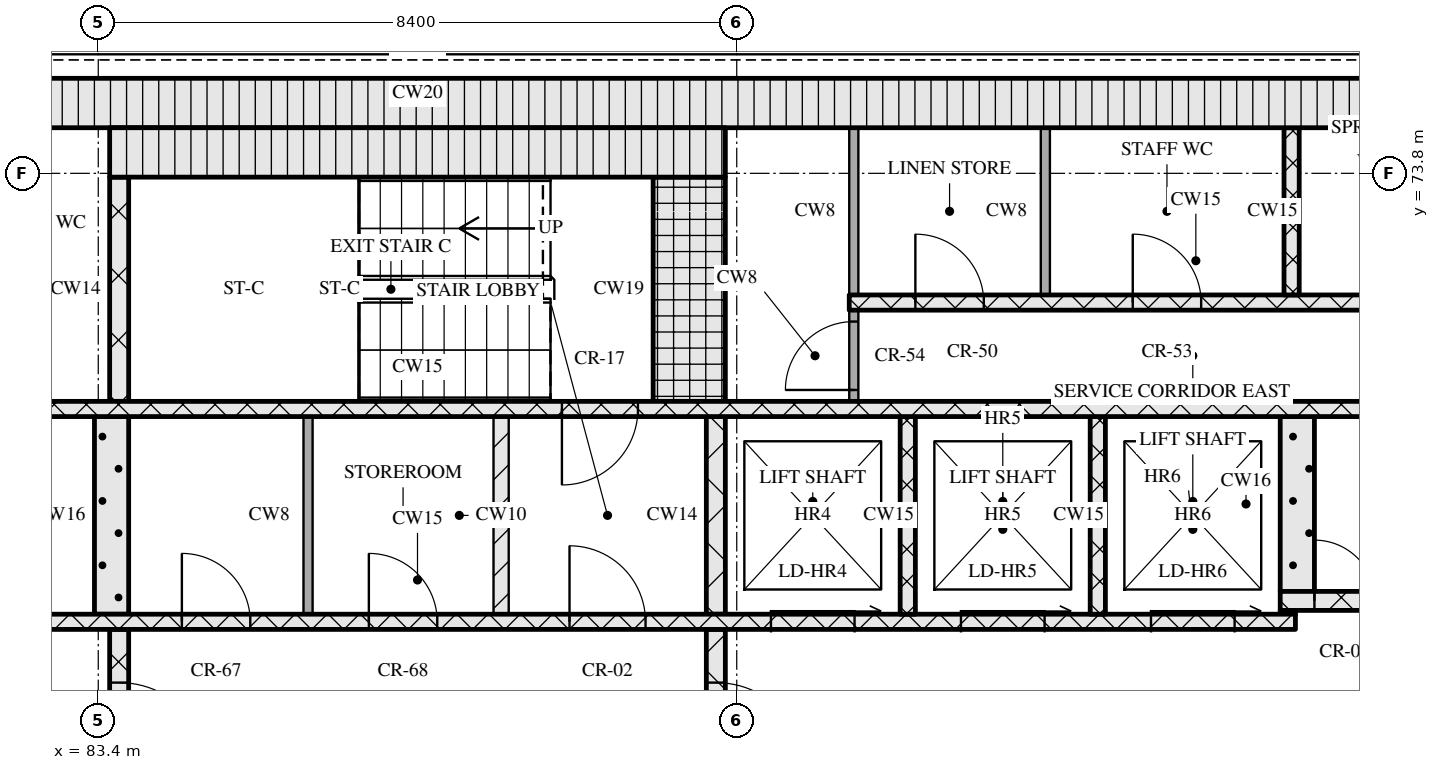
"""IFC4 building model, lengths in metres.
Left out: names, types, materials, properties, quantities, classifications, styles, units other than length and angle.
Written with IfcOpenShell. Run it as: python <this file> out.ifc"""

import sys

from ifc_helpers import new_model, si_unit, direction, frame, frame_2d, origin, place, context, subcontext, project, spatial, rectangle, extrude, element, fill, save


model = new_model("IFC4")
c1 = context("Model", 3, precision=1e-05, world=origin(), true_north=direction((0.0, 1.0)))
c2 = subcontext(c1, "Body", "Model", "MODEL_VIEW")
j1 = project(units=[si_unit("LENGTHUNIT", "METRE"), si_unit("PLANEANGLEUNIT", "RADIAN")], contexts=[c1])
p1 = place(None, origin())
s1 = spatial("IfcSite", under=j1, at=p1, CompositionType="ELEMENT")
p2 = place(p1, origin())
s2 = spatial("IfcBuilding", under=s1, at=p2, CompositionType="ELEMENT")
p3 = place(p2, frame((0.0, 0.0, 205.5)))
s3 = spatial("IfcBuildingStorey", under=s2, at=p3, CompositionType="ELEMENT", Elevation=205.5)
p4 = place(p3, frame((67.15, 74.725, 0.0), z_axis=(0.0, 0.0, 1.0), x_axis=(1.0, 0.0, 0.0)))
e1 = element("IfcWall", 1, at=p4, inside=s3, PredefinedType="SOLIDWALL", context=c2, shape_type="SweptSolid", body=[
    extrude(rectangle(XDim=40.9, YDim=0.65, at=frame_2d((20.45, 0.0))), origin(), (0.0, 0.0, 1.0), 3.32),
])
p5 = place(p3, frame((83.675, 65.2, 0.0), z_axis=(0.0, 0.0, 1.0), x_axis=(0.0, 1.0, 0.0)))
e2 = element("IfcWall", 2, at=p5, inside=s3, PredefinedType="SOLIDWALL", context=c2, shape_type="SweptSolid", body=[
    extrude(rectangle(XDim=2.6, YDim=0.25, at=frame_2d((1.3, 0.0))), origin(), (0.0, 0.0, 1.0), 3.32),
])
p6 = place(p5, frame((0.7, 0.0, 0.0)))
e3 = element("IfcOpeningElement", 3, at=p6, cuts=e2, PredefinedType="OPENING", context=c2, shape_type="SweptSolid", body=[
    extrude(rectangle(XDim=1.2, YDim=2.1, at=frame_2d((0.6, 1.05))), frame((0.0, 0.135, 0.0), z_axis=(0.0, -1.0, 0.0), x_axis=(1.0, 0.0, 0.0)), (0.0, 0.0, 1.0), 0.27),
])
p7 = place(p3, frame((91.525, 65.2, 0.0), z_axis=(0.0, 0.0, 1.0), x_axis=(0.0, 1.0, 0.0)))
e4 = element("IfcWall", 4, at=p7, inside=s3, PredefinedType="SOLIDWALL", context=c2, shape_type="SweptSolid", body=[
    extrude(rectangle(XDim=2.6, YDim=0.25, at=frame_2d((1.3, 0.0))), origin(), (0.0, 0.0, 1.0), 3.32),
])
p8 = place(p7, frame((0.7, 0.0, 0.0)))
e5 = element("IfcOpeningElement", 5, at=p8, cuts=e4, PredefinedType="OPENING", context=c2, shape_type="SweptSolid", body=[
    extrude(rectangle(XDim=1.2, YDim=2.1, at=frame_2d((0.6, 1.05))), frame((0.0, 0.135, 0.0), z_axis=(0.0, -1.0, 0.0), x_axis=(1.0, 0.0, 0.0)), (0.0, 0.0, 1.0), 0.27),
])
p9 = place(p3, frame((76.05, 67.9, 0.0), z_axis=(0.0, 0.0, 1.0), x_axis=(1.0, 0.0, 0.0)))
e6 = element("IfcWall", 6, at=p9, inside=s3, PredefinedType="SOLIDWALL", context=c2, shape_type="SweptSolid", body=[
    extrude(rectangle(XDim=23.1, YDim=0.2, at=frame_2d((11.55, 0.0))), origin(), (0.0, 0.0, 1.0), 3.32),
])
p10 = place(p9, frame((1.4, 0.0, 0.0)))
e7 = element("IfcOpeningElement", 7, at=p10, cuts=e6, PredefinedType="OPENING", context=c2, shape_type="SweptSolid", body=[
    extrude(rectangle(XDim=0.9, YDim=2.1, at=frame_2d((0.45, 1.05))), frame((0.0, 0.11, 0.0), z_axis=(0.0, -1.0, 0.0), x_axis=(1.0, 0.0, 0.0)), (0.0, 0.0, 1.0), 0.22),
])
p11 = place(p9, frame((5.11, 0.0, 0.0)))
e8 = element("IfcOpeningElement", 8, at=p11, cuts=e6, PredefinedType="OPENING", context=c2, shape_type="SweptSolid", body=[
    extrude(rectangle(XDim=0.9, YDim=2.1, at=frame_2d((0.45, 1.05))), frame((0.0, 0.11, 0.0), z_axis=(0.0, -1.0, 0.0), x_axis=(1.0, 0.0, 0.0)), (0.0, 0.0, 1.0), 0.22),
])
p12 = place(p9, frame((8.45, 0.0, 0.0)))
e9 = element("IfcOpeningElement", 9, at=p12, cuts=e6, PredefinedType="OPENING", context=c2, shape_type="SweptSolid", body=[
    extrude(rectangle(XDim=0.9, YDim=2.1, at=frame_2d((0.45, 1.05))), frame((0.0, 0.11, 0.0), z_axis=(0.0, -1.0, 0.0), x_axis=(1.0, 0.0, 0.0)), (0.0, 0.0, 1.0), 0.22),
])
p13 = place(p9, frame((10.91, 0.0, 0.0)))
e10 = element("IfcOpeningElement", 10, at=p13, cuts=e6, PredefinedType="OPENING", context=c2, shape_type="SweptSolid", body=[
    extrude(rectangle(XDim=0.9, YDim=2.1, at=frame_2d((0.45, 1.05))), frame((0.0, 0.11, 0.0), z_axis=(0.0, -1.0, 0.0), x_axis=(1.0, 0.0, 0.0)), (0.0, 0.0, 1.0), 0.22),
])
p14 = place(p9, frame((13.55, 0.0, 0.0)))
e11 = element("IfcOpeningElement", 11, at=p14, cuts=e6, PredefinedType="OPENING", context=c2, shape_type="SweptSolid", body=[
    extrude(rectangle(XDim=1.0, YDim=2.1, at=frame_2d((0.5, 1.05))), frame((0.0, 0.11, 0.0), z_axis=(0.0, -1.0, 0.0), x_axis=(1.0, 0.0, 0.0)), (0.0, 0.0, 1.0), 0.22),
])
p15 = place(p9, frame((16.2, 0.0, 0.0)))
e12 = element("IfcOpeningElement", 12, at=p15, cuts=e6, PredefinedType="OPENING", context=c2, shape_type="SweptSolid", body=[
    extrude(rectangle(XDim=1.1, YDim=2.1, at=frame_2d((0.55, 1.05))), frame((0.0, 0.11, 0.0), z_axis=(0.0, -1.0, 0.0), x_axis=(1.0, 0.0, 0.0)), (0.0, 0.0, 1.0), 0.22),
])
p16 = place(p9, frame((18.7, 0.0, 0.0)))
e13 = element("IfcOpeningElement", 13, at=p16, cuts=e6, PredefinedType="OPENING", context=c2, shape_type="SweptSolid", body=[
    extrude(rectangle(XDim=1.1, YDim=2.1, at=frame_2d((0.55, 1.05))), frame((0.0, 0.11, 0.0), z_axis=(0.0, -1.0, 0.0), x_axis=(1.0, 0.0, 0.0)), (0.0, 0.0, 1.0), 0.22),
])
p17 = place(p9, frame((21.2, 0.0, 0.0)))
e14 = element("IfcOpeningElement", 14, at=p17, cuts=e6, PredefinedType="OPENING", context=c2, shape_type="SweptSolid", body=[
    extrude(rectangle(XDim=1.1, YDim=2.1, at=frame_2d((0.55, 1.05))), frame((0.0, 0.11, 0.0), z_axis=(0.0, -1.0, 0.0), x_axis=(1.0, 0.0, 0.0)), (0.0, 0.0, 1.0), 0.22),
])
p18 = place(p3, frame((83.575, 68.0, 0.0), z_axis=(0.0, 0.0, 1.0), x_axis=(0.0, 1.0, 0.0)))
e15 = element("IfcWall", 15, at=p18, inside=s3, PredefinedType="SOLIDWALL", context=c2, shape_type="SweptSolid", body=[
    extrude(rectangle(XDim=2.6, YDim=0.45, at=frame_2d((1.3, 0.0))), origin(), (0.0, 0.0, 1.0), 3.32),
])
p19 = place(p3, frame((86.16, 68.0, 0.0), z_axis=(0.0, 0.0, 1.0), x_axis=(0.0, 1.0, 0.0)))
e16 = element("IfcWall", 16, at=p19, inside=s3, PredefinedType="PARTITIONING", context=c2, shape_type="SweptSolid", body=[
    extrude(rectangle(XDim=2.6, YDim=0.12, at=frame_2d((1.3, 0.0))), origin(), (0.0, 0.0, 1.0), 3.32),
])
p20 = place(p3, frame((88.7, 68.0, 0.0), z_axis=(0.0, 0.0, 1.0), x_axis=(0.0, 1.0, 0.0)))
e17 = element("IfcWall", 17, at=p20, inside=s3, PredefinedType="PARTITIONING", context=c2, shape_type="SweptSolid", body=[
    extrude(rectangle(XDim=2.6, YDim=0.2, at=frame_2d((1.3, 0.0))), origin(), (0.0, 0.0, 1.0), 3.32),
])
p21 = place(p3, frame((91.525, 68.0, 0.0), z_axis=(0.0, 0.0, 1.0), x_axis=(0.0, 1.0, 0.0)))
e18 = element("IfcWall", 18, at=p21, inside=s3, PredefinedType="SOLIDWALL", context=c2, shape_type="SweptSolid", body=[
    extrude(rectangle(XDim=2.6, YDim=0.25, at=frame_2d((1.3, 0.0))), origin(), (0.0, 0.0, 1.0), 3.32),
])
for number, where, z_axis, x_axis in (
    (19, (94.05, 68.0, 0.0), (0.0, 0.0, 1.0), (0.0, 1.0, 0.0)),
    (20, (96.55, 68.0, 0.0), (0.0, 0.0, 1.0), (0.0, 1.0, 0.0)),
):
    element("IfcWall", number, at=place(p3, frame(where, z_axis=z_axis, x_axis=x_axis)), inside=s3, PredefinedType="SOLIDWALL", context=c2, shape_type="SweptSolid", body=[
        extrude(rectangle(XDim=2.6, YDim=0.2, at=frame_2d((1.3, 0.0))), origin(), (0.0, 0.0, 1.0), 3.32),
    ])
p22 = place(p3, frame((98.95, 68.025, 0.0), z_axis=(0.0, 0.0, 1.0), x_axis=(1.0, 0.0, 0.0)))
e21 = element("IfcWall", 21, at=p22, inside=s3, PredefinedType="SOLIDWALL", context=c2, shape_type="SweptSolid", body=[
    extrude(rectangle(XDim=0.2, YDim=0.05, at=frame_2d((0.1, 0.0))), origin(), (0.0, 0.0, 1.0), 3.32),
])
p23 = place(p3, frame((98.95, 68.175, 0.0), z_axis=(0.0, 0.0, 1.0), x_axis=(1.0, 0.0, 0.0)))
e22 = element("IfcWall", 22, at=p23, inside=s3, PredefinedType="SOLIDWALL", context=c2, shape_type="SweptSolid", body=[
    extrude(rectangle(XDim=8.45, YDim=0.25, at=frame_2d((4.225, 0.0))), origin(), (0.0, 0.0, 1.0), 3.32),
])
p24 = place(p23, frame((0.45, 0.0, 0.0)))
e23 = element("IfcOpeningElement", 23, at=p24, cuts=e22, PredefinedType="OPENING", context=c2, shape_type="SweptSolid", body=[
    extrude(rectangle(XDim=0.8, YDim=2.1, at=frame_2d((0.4, 1.05))), frame((0.0, 0.135, 0.0), z_axis=(0.0, -1.0, 0.0), x_axis=(1.0, 0.0, 0.0)), (0.0, 0.0, 1.0), 0.27),
])
p25 = place(p23, frame((1.75, 0.0, 0.0)))
e24 = element("IfcOpeningElement", 24, at=p25, cuts=e22, PredefinedType="OPENING", context=c2, shape_type="SweptSolid", body=[
    extrude(rectangle(XDim=1.0, YDim=2.1, at=frame_2d((0.5, 1.05))), frame((0.0, 0.135, 0.0), z_axis=(0.0, -1.0, 0.0), x_axis=(1.0, 0.0, 0.0)), (0.0, 0.0, 1.0), 0.27),
])
p26 = place(p3, frame((99.175, 68.3, 0.0), z_axis=(0.0, 0.0, 1.0), x_axis=(0.0, 1.0, 0.0)))
e25 = element("IfcWall", 25, at=p26, inside=s3, PredefinedType="SOLIDWALL", context=c2, shape_type="SweptSolid", body=[
    extrude(rectangle(XDim=2.3, YDim=0.45, at=frame_2d((1.15, 0.0))), origin(), (0.0, 0.0, 1.0), 3.32),
])
p27 = place(p3, frame((67.8, 70.7, 0.0), z_axis=(0.0, 0.0, 1.0), x_axis=(1.0, 0.0, 0.0)))
e26 = element("IfcWall", 26, at=p27, inside=s3, PredefinedType="SOLIDWALL", context=c2, shape_type="SweptSolid", body=[
    extrude(rectangle(XDim=39.6, YDim=0.2, at=frame_2d((19.8, 0.0))), origin(), (0.0, 0.0, 1.0), 3.32),
])
p28 = place(p27, frame((0.65, 0.0, 0.0)))
e27 = element("IfcOpeningElement", 27, at=p28, cuts=e26, PredefinedType="OPENING", context=c2, shape_type="SweptSolid", body=[
    extrude(rectangle(XDim=1.1, YDim=2.1, at=frame_2d((0.55, 1.05))), frame((0.0, 0.11, 0.0), z_axis=(0.0, -1.0, 0.0), x_axis=(1.0, 0.0, 0.0)), (0.0, 0.0, 1.0), 0.22),
])
p29 = place(p27, frame((3.25, 0.0, 0.0)))
e28 = element("IfcOpeningElement", 28, at=p29, cuts=e26, PredefinedType="OPENING", context=c2, shape_type="SweptSolid", body=[
    extrude(rectangle(XDim=1.1, YDim=2.1, at=frame_2d((0.55, 1.05))), frame((0.0, 0.11, 0.0), z_axis=(0.0, -1.0, 0.0), x_axis=(1.0, 0.0, 0.0)), (0.0, 0.0, 1.0), 0.22),
])
p30 = place(p27, frame((5.9, 0.0, 0.0)))
e29 = element("IfcOpeningElement", 29, at=p30, cuts=e26, PredefinedType="OPENING", context=c2, shape_type="SweptSolid", body=[
    extrude(rectangle(XDim=1.0, YDim=2.1, at=frame_2d((0.5, 1.05))), frame((0.0, 0.11, 0.0), z_axis=(0.0, -1.0, 0.0), x_axis=(1.0, 0.0, 0.0)), (0.0, 0.0, 1.0), 0.22),
])
p31 = place(p27, frame((21.7, 0.0, 0.0)))
e30 = element("IfcOpeningElement", 30, at=p31, cuts=e26, PredefinedType="OPENING", context=c2, shape_type="SweptSolid", body=[
    extrude(rectangle(XDim=1.0, YDim=2.1, at=frame_2d((0.5, 1.05))), frame((0.0, 0.11, 0.0), z_axis=(0.0, -1.0, 0.0), x_axis=(1.0, 0.0, 0.0)), (0.0, 0.0, 1.0), 0.22),
])
p32 = place(p27, frame((32.7, 0.0, 0.0)))
e31 = element("IfcOpeningElement", 31, at=p32, cuts=e26, PredefinedType="OPENING", context=c2, shape_type="SweptSolid", body=[
    extrude(rectangle(XDim=1.0, YDim=2.1, at=frame_2d((0.5, 1.05))), frame((0.0, 0.11, 0.0), z_axis=(0.0, -1.0, 0.0), x_axis=(1.0, 0.0, 0.0)), (0.0, 0.0, 1.0), 0.22),
])
p33 = place(p27, frame((35.25, 0.0, 0.0)))
e32 = element("IfcOpeningElement", 32, at=p33, cuts=e26, PredefinedType="OPENING", context=c2, shape_type="SweptSolid", body=[
    extrude(rectangle(XDim=1.1, YDim=2.1, at=frame_2d((0.55, 1.05))), frame((0.0, 0.11, 0.0), z_axis=(0.0, -1.0, 0.0), x_axis=(1.0, 0.0, 0.0)), (0.0, 0.0, 1.0), 0.22),
])
p34 = place(p27, frame((37.85, 0.0, 0.0)))
e33 = element("IfcOpeningElement", 33, at=p34, cuts=e26, PredefinedType="OPENING", context=c2, shape_type="SweptSolid", body=[
    extrude(rectangle(XDim=1.1, YDim=2.1, at=frame_2d((0.55, 1.05))), frame((0.0, 0.11, 0.0), z_axis=(0.0, -1.0, 0.0), x_axis=(1.0, 0.0, 0.0)), (0.0, 0.0, 1.0), 0.22),
])
p35 = place(p3, frame((83.675, 70.8, 0.0), z_axis=(0.0, 0.0, 1.0), x_axis=(0.0, 1.0, 0.0)))
e34 = element("IfcWall", 34, at=p35, inside=s3, PredefinedType="SOLIDWALL", context=c2, shape_type="SweptSolid", body=[
    extrude(rectangle(XDim=2.95, YDim=0.25, at=frame_2d((1.475, 0.0))), origin(), (0.0, 0.0, 1.0), 3.32),
])
p36 = place(p3, frame((91.175, 70.8, 0.0), z_axis=(0.0, 0.0, 1.0), x_axis=(0.0, 1.0, 0.0)))
e35 = element("IfcWall", 35, at=p36, inside=s3, PredefinedType="SOLIDWALL", context=c2, shape_type="SweptSolid", body=[
    extrude(rectangle(XDim=2.95, YDim=0.95, at=frame_2d((1.475, 0.0))), origin(), (0.0, 0.0, 1.0), 3.32),
])
p37 = place(p3, frame((93.34, 70.8, 0.0), z_axis=(0.0, 0.0, 1.0), x_axis=(0.0, 1.0, 0.0)))
e36 = element("IfcWall", 36, at=p37, inside=s3, PredefinedType="PARTITIONING", context=c2, shape_type="SweptSolid", body=[
    extrude(rectangle(XDim=1.2, YDim=0.12, at=frame_2d((0.6, 0.0))), origin(), (0.0, 0.0, 1.0), 3.32),
])
p38 = place(p37, frame((0.15, 0.0, 0.0)))
e37 = element("IfcOpeningElement", 37, at=p38, cuts=e36, PredefinedType="OPENING", context=c2, shape_type="SweptSolid", body=[
    extrude(rectangle(XDim=0.9, YDim=2.1, at=frame_2d((0.45, 1.05))), frame((0.0, 0.07, 0.0), z_axis=(0.0, -1.0, 0.0), x_axis=(1.0, 0.0, 0.0)), (0.0, 0.0, 1.0), 0.14),
])
p39 = place(p3, frame((93.28, 72.1, 0.0), z_axis=(0.0, 0.0, 1.0), x_axis=(1.0, 0.0, 0.0)))
e38 = element("IfcWall", 38, at=p39, inside=s3, PredefinedType="SOLIDWALL", context=c2, shape_type="SweptSolid", body=[
    extrude(rectangle(XDim=9.12, YDim=0.2, at=frame_2d((4.56, 0.0))), origin(), (0.0, 0.0, 1.0), 3.32),
])
p40 = place(p39, frame((0.87, 0.0, 0.0)))
e39 = element("IfcOpeningElement", 39, at=p40, cuts=e38, PredefinedType="OPENING", context=c2, shape_type="SweptSolid", body=[
    extrude(rectangle(XDim=0.9, YDim=2.1, at=frame_2d((0.45, 1.05))), frame((0.0, 0.11, 0.0), z_axis=(0.0, -1.0, 0.0), x_axis=(1.0, 0.0, 0.0)), (0.0, 0.0, 1.0), 0.22),
])
p41 = place(p39, frame((3.73, 0.0, 0.0)))
e40 = element("IfcOpeningElement", 40, at=p41, cuts=e38, PredefinedType="OPENING", context=c2, shape_type="SweptSolid", body=[
    extrude(rectangle(XDim=0.9, YDim=2.1, at=frame_2d((0.45, 1.05))), frame((0.0, 0.11, 0.0), z_axis=(0.0, -1.0, 0.0), x_axis=(1.0, 0.0, 0.0)), (0.0, 0.0, 1.0), 0.22),
])
p42 = place(p39, frame((6.97, 0.0, 0.0)))
e41 = element("IfcOpeningElement", 41, at=p42, cuts=e38, PredefinedType="OPENING", context=c2, shape_type="SweptSolid", body=[
    extrude(rectangle(XDim=0.9, YDim=2.1, at=frame_2d((0.45, 1.05))), frame((0.0, 0.11, 0.0), z_axis=(0.0, -1.0, 0.0), x_axis=(1.0, 0.0, 0.0)), (0.0, 0.0, 1.0), 0.22),
])
for number, where, z_axis, x_axis in (
    (42, (93.34, 72.2, 0.0), (0.0, 0.0, 1.0), (0.0, 1.0, 0.0)),
    (43, (95.86, 72.2, 0.0), (0.0, 0.0, 1.0), (0.0, 1.0, 0.0)),
):
    element("IfcWall", number, at=place(p3, frame(where, z_axis=z_axis, x_axis=x_axis)), inside=s3, PredefinedType="PARTITIONING", context=c2, shape_type="SweptSolid", body=[
        extrude(rectangle(XDim=2.2, YDim=0.12, at=frame_2d((1.1, 0.0))), origin(), (0.0, 0.0, 1.0), 3.32),
    ])
p43 = place(p3, frame((99.1, 72.2, 0.0), z_axis=(0.0, 0.0, 1.0), x_axis=(0.0, 1.0, 0.0)))
e44 = element("IfcWall", 44, at=p43, inside=s3, PredefinedType="SOLIDWALL", context=c2, shape_type="SweptSolid", body=[
    extrude(rectangle(XDim=2.2, YDim=0.2, at=frame_2d((1.1, 0.0))), origin(), (0.0, 0.0, 1.0), 3.32),
])
p44 = place(p3, frame((83.55, 74.075, 0.0), z_axis=(0.0, 0.0, 1.0), x_axis=(1.0, 0.0, 0.0)))
e45 = element("IfcWall", 45, at=p44, inside=s3, PredefinedType="SOLIDWALL", context=c2, shape_type="SweptSolid", body=[
    extrude(rectangle(XDim=8.1, YDim=0.65, at=frame_2d((4.05, 0.0))), origin(), (0.0, 0.0, 1.0), 3.32),
])
p45 = place(p6, origin())
e46 = element("IfcDoor", 46, at=p45, inside=s3, OperationType="SINGLE_SWING_RIGHT", PredefinedType="DOOR", context=c2, shape_type="SweptSolid", body=[
    extrude(rectangle(XDim=1.2, YDim=2.1, at=frame_2d((0.6, 1.05))), frame((0.0, 0.025, 0.0), z_axis=(0.0, -1.0, 0.0), x_axis=(1.0, 0.0, 0.0)), (0.0, 0.0, 1.0), 0.05),
])
fill(e3, e46)
p46 = place(p8, origin())
e47 = element("IfcDoor", 47, at=p46, inside=s3, OperationType="SINGLE_SWING_RIGHT", PredefinedType="DOOR", context=c2, shape_type="SweptSolid", body=[
    extrude(rectangle(XDim=1.2, YDim=2.1, at=frame_2d((0.6, 1.05))), frame((0.0, 0.025, 0.0), z_axis=(0.0, -1.0, 0.0), x_axis=(1.0, 0.0, 0.0)), (0.0, 0.0, 1.0), 0.05),
])
fill(e5, e47)
p47 = place(p12, origin())
e48 = element("IfcDoor", 48, at=p47, inside=s3, OperationType="SINGLE_SWING_LEFT", PredefinedType="DOOR", context=c2, shape_type="SweptSolid", body=[
    extrude(rectangle(XDim=0.9, YDim=2.1, at=frame_2d((0.45, 1.05))), frame((0.0, 0.025, 0.0), z_axis=(0.0, -1.0, 0.0), x_axis=(1.0, 0.0, 0.0)), (0.0, 0.0, 1.0), 0.05),
])
fill(e9, e48)
p48 = place(p13, origin())
e49 = element("IfcDoor", 49, at=p48, inside=s3, OperationType="SINGLE_SWING_LEFT", PredefinedType="DOOR", context=c2, shape_type="SweptSolid", body=[
    extrude(rectangle(XDim=0.9, YDim=2.1, at=frame_2d((0.45, 1.05))), frame((0.0, 0.025, 0.0), z_axis=(0.0, -1.0, 0.0), x_axis=(1.0, 0.0, 0.0)), (0.0, 0.0, 1.0), 0.05),
])
fill(e10, e49)
p49 = place(p14, origin())
e50 = element("IfcDoor", 50, at=p49, inside=s3, OperationType="SINGLE_SWING_LEFT", PredefinedType="DOOR", context=c2, shape_type="SweptSolid", body=[
    extrude(rectangle(XDim=1.0, YDim=2.1, at=frame_2d((0.5, 1.05))), frame((0.0, 0.025, 0.0), z_axis=(0.0, -1.0, 0.0), x_axis=(1.0, 0.0, 0.0)), (0.0, 0.0, 1.0), 0.05),
])
fill(e11, e50)
p50 = place(p15, origin())
e51 = element("IfcDoor", 51, at=p50, inside=s3, OperationType="SLIDING_TO_RIGHT", PredefinedType="DOOR", context=c2, shape_type="SweptSolid", body=[
    extrude(rectangle(XDim=1.1, YDim=2.1, at=frame_2d((0.55, 1.05))), frame((0.0, 0.025, 0.0), z_axis=(0.0, -1.0, 0.0), x_axis=(1.0, 0.0, 0.0)), (0.0, 0.0, 1.0), 0.05),
])
fill(e12, e51)
p51 = place(p16, origin())
e52 = element("IfcDoor", 52, at=p51, inside=s3, OperationType="SLIDING_TO_RIGHT", PredefinedType="DOOR", context=c2, shape_type="SweptSolid", body=[
    extrude(rectangle(XDim=1.1, YDim=2.1, at=frame_2d((0.55, 1.05))), frame((0.0, 0.025, 0.0), z_axis=(0.0, -1.0, 0.0), x_axis=(1.0, 0.0, 0.0)), (0.0, 0.0, 1.0), 0.05),
])
fill(e13, e52)
p52 = place(p17, origin())
e53 = element("IfcDoor", 53, at=p52, inside=s3, OperationType="SLIDING_TO_RIGHT", PredefinedType="DOOR", context=c2, shape_type="SweptSolid", body=[
    extrude(rectangle(XDim=1.1, YDim=2.1, at=frame_2d((0.55, 1.05))), frame((0.0, 0.025, 0.0), z_axis=(0.0, -1.0, 0.0), x_axis=(1.0, 0.0, 0.0)), (0.0, 0.0, 1.0), 0.05),
])
fill(e14, e53)
p53 = place(p24, origin())
e54 = element("IfcDoor", 54, at=p53, inside=s3, OperationType="SINGLE_SWING_LEFT", PredefinedType="DOOR", context=c2, shape_type="SweptSolid", body=[
    extrude(rectangle(XDim=0.8, YDim=2.1, at=frame_2d((0.4, 1.05))), frame((0.0, 0.025, 0.0), z_axis=(0.0, -1.0, 0.0), x_axis=(1.0, 0.0, 0.0)), (0.0, 0.0, 1.0), 0.05),
])
fill(e23, e54)
p54 = place(p31, origin())
e55 = element("IfcDoor", 55, at=p54, inside=s3, OperationType="SINGLE_SWING_RIGHT", PredefinedType="DOOR", context=c2, shape_type="SweptSolid", body=[
    extrude(rectangle(XDim=1.0, YDim=2.1, at=frame_2d((0.5, 1.05))), frame((0.0, 0.025, 0.0), z_axis=(0.0, -1.0, 0.0), x_axis=(1.0, 0.0, 0.0)), (0.0, 0.0, 1.0), 0.05),
])
fill(e30, e55)
p55 = place(p38, origin())
e56 = element("IfcDoor", 56, at=p55, inside=s3, OperationType="SINGLE_SWING_LEFT", PredefinedType="DOOR", context=c2, shape_type="SweptSolid", body=[
    extrude(rectangle(XDim=0.9, YDim=2.1, at=frame_2d((0.45, 1.05))), frame((0.0, 0.025, 0.0), z_axis=(0.0, -1.0, 0.0), x_axis=(1.0, 0.0, 0.0)), (0.0, 0.0, 1.0), 0.05),
])
fill(e37, e56)
p56 = place(p40, origin())
e57 = element("IfcDoor", 57, at=p56, inside=s3, OperationType="SINGLE_SWING_LEFT", PredefinedType="DOOR", context=c2, shape_type="SweptSolid", body=[
    extrude(rectangle(XDim=0.9, YDim=2.1, at=frame_2d((0.45, 1.05))), frame((0.0, 0.025, 0.0), z_axis=(0.0, -1.0, 0.0), x_axis=(1.0, 0.0, 0.0)), (0.0, 0.0, 1.0), 0.05),
])
fill(e39, e57)
p57 = place(p41, origin())
e58 = element("IfcDoor", 58, at=p57, inside=s3, OperationType="SINGLE_SWING_LEFT", PredefinedType="DOOR", context=c2, shape_type="SweptSolid", body=[
    extrude(rectangle(XDim=0.9, YDim=2.1, at=frame_2d((0.45, 1.05))), frame((0.0, 0.025, 0.0), z_axis=(0.0, -1.0, 0.0), x_axis=(1.0, 0.0, 0.0)), (0.0, 0.0, 1.0), 0.05),
])
fill(e40, e58)
save(model, sys.argv[1])
